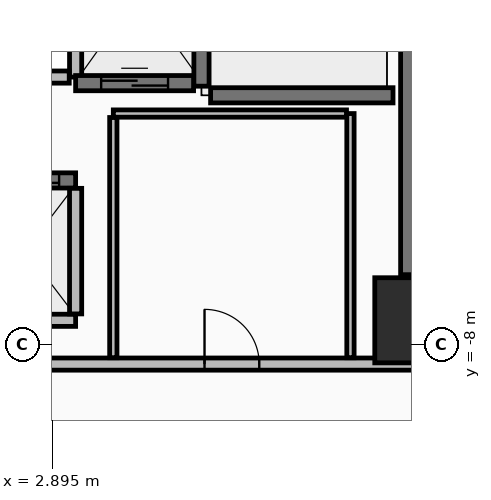
"""IFC4 building model, lengths in metres.
Left out: names, types, materials, properties, quantities, classifications, styles, units other than length and angle.
Written with IfcOpenShell. Run it as: python <this file> out.ifc"""

import sys

from ifc_helpers import new_model, si_unit, direction, frame, frame_2d, origin, origin_2d, place, context, subcontext, project, spatial, rectangle, extrude, element, fill, save


model = new_model("IFC4")
c1 = context("Model", 3, precision=1e-05, world=origin(), true_north=direction((0.0, 1.0)))
c2 = subcontext(c1, "Body", "Model", "MODEL_VIEW")
j1 = project(units=[si_unit("LENGTHUNIT", "METRE"), si_unit("PLANEANGLEUNIT", "RADIAN")], contexts=[c1])
p1 = place(None, origin())
s1 = spatial("IfcSite", under=j1, at=p1, CompositionType="ELEMENT")
p2 = place(p1, origin())
s2 = spatial("IfcBuilding", under=s1, at=p2, CompositionType="ELEMENT")
p3 = place(p2, frame((0.0, 0.0, 48.85)))
s3 = spatial("IfcBuildingStorey", under=s2, at=p3, CompositionType="ELEMENT", Elevation=48.85)
p4 = place(p3, frame((8.9, -7.6, 0.0), z_axis=(0.0, 0.0, 1.0), x_axis=(1.0, 0.0, 0.0)))
e1 = element("IfcColumn", 1, at=p4, inside=s3, PredefinedType="COLUMN", context=c2, shape_type="SweptSolid", body=[
    extrude(rectangle(XDim=1.4, YDim=1.4, at=origin_2d()), origin(), (0.0, 0.0, 1.0), 3.4),
])
p5 = place(p3, frame((8.9, -6.85, 0.0), z_axis=(0.0, 0.0, 1.0), x_axis=(0.0, 1.0, 0.0)))
e2 = element("IfcWall", 2, at=p5, inside=s3, PredefinedType="SHEAR", context=c2, shape_type="SweptSolid", body=[
    extrude(rectangle(XDim=10.7, YDim=0.55, at=frame_2d((5.35, 0.0))), origin(), (0.0, 0.0, 1.0), 3.225),
])
p6 = place(p3, frame((-9.62, -8.32, 0.0), z_axis=(0.0, 0.0, 1.0), x_axis=(1.0, 0.0, 0.0)))
e3 = element("IfcWall", 3, at=p6, inside=s3, PredefinedType="PARTITIONING", context=c2, shape_type="SweptSolid", body=[
    extrude(rectangle(XDim=19.24, YDim=0.2, at=frame_2d((9.62, 0.0))), origin(), (0.0, 0.0, 1.0), 2.62),
])
p7 = place(p6, frame((15.02, 0.0, 0.0)))
e4 = element("IfcOpeningElement", 4, at=p7, cuts=e3, PredefinedType="OPENING", context=c2, shape_type="SweptSolid", body=[
    extrude(rectangle(XDim=0.9, YDim=2.1, at=frame_2d((0.45, 1.05))), frame((0.0, 0.11, 0.0), z_axis=(0.0, -1.0, 0.0), x_axis=(1.0, 0.0, 0.0)), (0.0, 0.0, 1.0), 0.22),
])
p8 = place(p3, frame((5.35, -3.75, 0.0), z_axis=(0.0, 0.0, 1.0), x_axis=(0.0, 1.0, 0.0)))
e5 = element("IfcWall", 5, at=p8, inside=s3, PredefinedType="SHEAR", context=c2, shape_type="SweptSolid", body=[
    extrude(rectangle(XDim=7.3, YDim=0.25, at=frame_2d((3.65, 0.0))), origin(), (0.0, 0.0, 1.0), 3.225),
])
p9 = place(p3, frame((5.5, -3.9, 0.0), z_axis=(0.0, 0.0, 1.0), x_axis=(1.0, 0.0, 0.0)))
e6 = element("IfcWall", 6, at=p9, inside=s3, PredefinedType="SHEAR", context=c2, shape_type="SweptSolid", body=[
    extrude(rectangle(XDim=3.0, YDim=0.25, at=frame_2d((1.5, 0.0))), origin(), (0.0, 0.0, 1.0), 3.225),
])
p10 = place(p3, frame((1.637, -5.3, 0.0), z_axis=(0.0, 0.0, 1.0), x_axis=(1.0, 0.0, 0.0)))
e7 = element("IfcWall", 7, at=p10, inside=s3, PredefinedType="SHEAR", context=c2, shape_type="SweptSolid", body=[
    extrude(rectangle(XDim=1.643, YDim=0.25, at=frame_2d((0.821, 0.0))), origin(), (0.0, 0.0, 1.0), 3.225),
])
p11 = place(p10, frame((0.271, 0.0, 0.0)))
e8 = element("IfcOpeningElement", 8, at=p11, cuts=e7, PredefinedType="OPENING", context=c2, shape_type="SweptSolid", body=[
    extrude(rectangle(XDim=1.1, YDim=2.2, at=frame_2d((0.55, 1.1))), frame((0.0, 0.135, 0.0), z_axis=(0.0, -1.0, 0.0), x_axis=(1.0, 0.0, 0.0)), (0.0, 0.0, 1.0), 0.27),
])
p12 = place(p3, frame((2.58, -7.6, 0.0), z_axis=(0.0, 0.0, 1.0), x_axis=(1.0, 0.0, 0.0)))
e9 = element("IfcWall", 9, at=p12, inside=s3, PredefinedType="PARTITIONING", context=c2, shape_type="SweptSolid", body=[
    extrude(rectangle(XDim=0.7, YDim=0.2, at=frame_2d((0.35, 0.0))), origin(), (0.0, 0.0, 1.0), 2.42),
])
p13 = place(p3, frame((3.28, -7.495, 0.0), z_axis=(0.0, 0.0, 1.0), x_axis=(0.0, 1.0, 0.0)))
e10 = element("IfcWall", 10, at=p13, inside=s3, PredefinedType="PARTITIONING", context=c2, shape_type="SweptSolid", body=[
    extrude(rectangle(XDim=2.065, YDim=0.2, at=frame_2d((1.033, 0.0))), origin(), (0.0, 0.0, 1.0), 2.42),
])
p14 = place(p3, frame((3.28, -3.6, 0.0), z_axis=(0.0, 0.0, 1.0), x_axis=(0.0, 1.0, 0.0)))
e11 = element("IfcWall", 11, at=p14, inside=s3, PredefinedType="PARTITIONING", context=c2, shape_type="SweptSolid", body=[
    extrude(rectangle(XDim=1.8, YDim=0.2, at=frame_2d((0.9, 0.0))), origin(), (0.0, 0.0, 1.0), 3.225),
])
p15 = place(p3, frame((1.13, -3.6, 0.0), z_axis=(0.0, 0.0, 1.0), x_axis=(1.0, 0.0, 0.0)))
e12 = element("IfcWall", 12, at=p15, inside=s3, PredefinedType="PARTITIONING", context=c2, shape_type="SweptSolid", body=[
    extrude(rectangle(XDim=2.045, YDim=0.2, at=frame_2d((1.022, 0.0))), origin(), (0.0, 0.0, 1.0), 3.225),
])
p16 = place(p3, frame((3.28, -3.7, 0.0), z_axis=(0.0, 0.0, 1.0), x_axis=(1.0, 0.0, 0.0)))
e13 = element("IfcWall", 13, at=p16, inside=s3, PredefinedType="SHEAR", context=c2, shape_type="SweptSolid", body=[
    extrude(rectangle(XDim=1.94, YDim=0.25, at=frame_2d((0.97, 0.0))), origin(), (0.0, 0.0, 1.0), 3.225),
])
p17 = place(p16, frame((0.42, 0.0, 0.0)))
e14 = element("IfcOpeningElement", 14, at=p17, cuts=e13, PredefinedType="OPENING", context=c2, shape_type="SweptSolid", body=[
    extrude(rectangle(XDim=1.1, YDim=2.2, at=frame_2d((0.55, 1.1))), frame((0.0, 0.135, 0.0), z_axis=(0.0, -1.0, 0.0), x_axis=(1.0, 0.0, 0.0)), (0.0, 0.0, 1.0), 0.27),
])
p18 = place(p3, frame((7.8, -8.215, 0.0), z_axis=(0.0, 0.0, 1.0), x_axis=(0.0, 1.0, 0.0)))
e15 = element("IfcWall", 15, at=p18, inside=s3, PredefinedType="PARTITIONING", context=c2, shape_type="SweptSolid", body=[
    extrude(rectangle(XDim=4.015, YDim=0.12, at=frame_2d((2.008, 0.0))), origin(), (0.0, 0.0, 1.0), 2.42),
])
p19 = place(p3, frame((7.735, -4.2, 0.0), z_axis=(0.0, 0.0, 1.0), x_axis=(-1.0, 0.0, 0.0)))
e16 = element("IfcWall", 16, at=p19, inside=s3, PredefinedType="PARTITIONING", context=c2, shape_type="SweptSolid", body=[
    extrude(rectangle(XDim=3.835, YDim=0.12, at=frame_2d((1.917, 0.0))), origin(), (0.0, 0.0, 1.0), 3.225),
])
p20 = place(p3, frame((3.9, -4.265, 0.0), z_axis=(0.0, 0.0, 1.0), x_axis=(0.0, -1.0, 0.0)))
e17 = element("IfcWall", 17, at=p20, inside=s3, PredefinedType="PARTITIONING", context=c2, shape_type="SweptSolid", body=[
    extrude(rectangle(XDim=3.95, YDim=0.12, at=frame_2d((1.975, 0.0))), origin(), (0.0, 0.0, 1.0), 2.42),
])
p21 = place(p11, origin())
e18 = element("IfcDoor", 18, at=p21, inside=s3, OperationType="SLIDING_TO_LEFT", PredefinedType="DOOR", context=c2, shape_type="SweptSolid", body=[
    extrude(rectangle(XDim=1.1, YDim=2.2, at=frame_2d((0.55, 1.1))), frame((0.0, 0.025, 0.0), z_axis=(0.0, -1.0, 0.0), x_axis=(1.0, 0.0, 0.0)), (0.0, 0.0, 1.0), 0.05),
])
fill(e8, e18)
p22 = place(p17, origin())
e19 = element("IfcDoor", 19, at=p22, inside=s3, OperationType="SLIDING_TO_LEFT", PredefinedType="DOOR", context=c2, shape_type="SweptSolid", body=[
    extrude(rectangle(XDim=1.1, YDim=2.2, at=frame_2d((0.55, 1.1))), frame((0.0, 0.025, 0.0), z_axis=(0.0, -1.0, 0.0), x_axis=(1.0, 0.0, 0.0)), (0.0, 0.0, 1.0), 0.05),
])
fill(e14, e19)
p23 = place(p7, origin())
e20 = element("IfcDoor", 20, at=p23, inside=s3, OperationType="SINGLE_SWING_LEFT", PredefinedType="DOOR", context=c2, shape_type="SweptSolid", body=[
    extrude(rectangle(XDim=0.9, YDim=2.1, at=frame_2d((0.45, 1.05))), frame((0.0, 0.025, 0.0), z_axis=(0.0, -1.0, 0.0), x_axis=(1.0, 0.0, 0.0)), (0.0, 0.0, 1.0), 0.05),
])
fill(e4, e20)
save(model, sys.argv[1])
